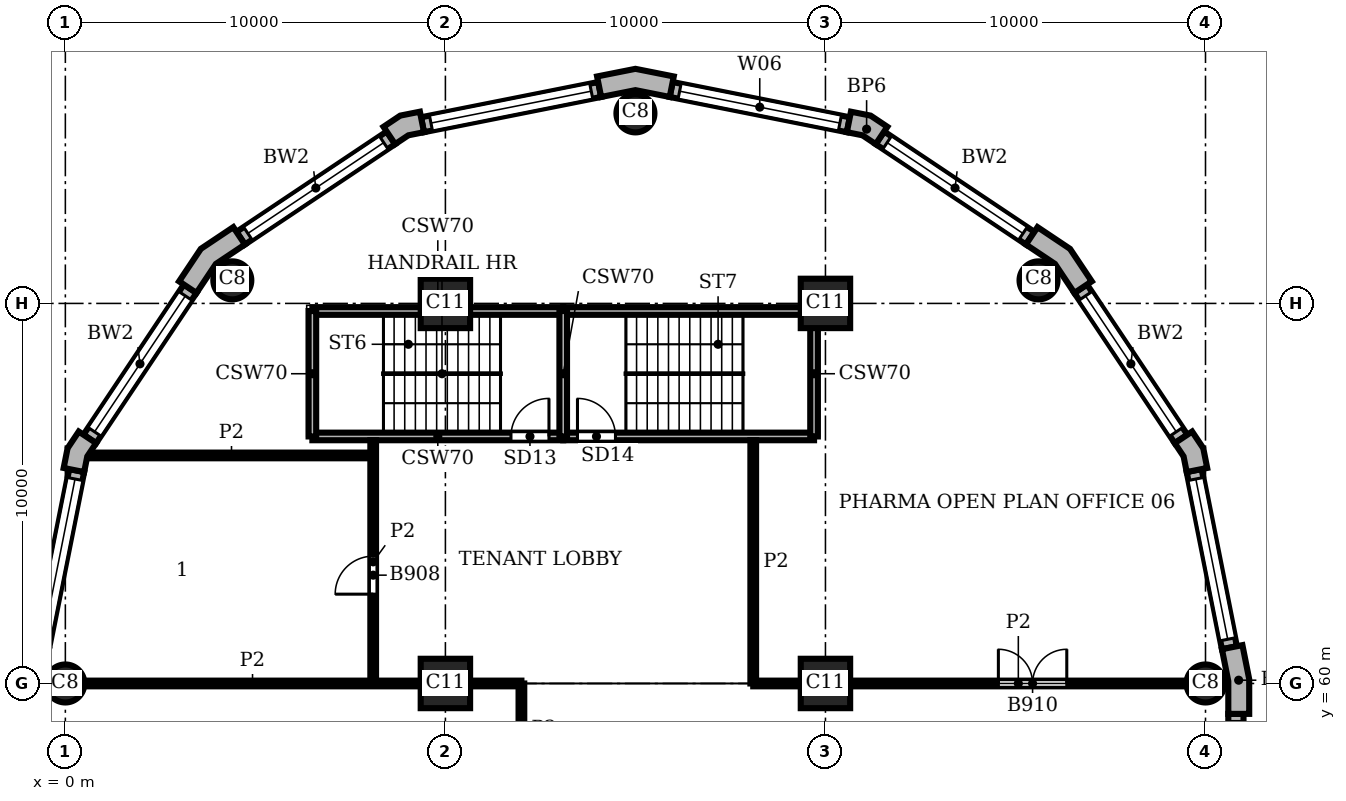
"""IFC4 building model, lengths in metres.
Left out: names, types, materials, properties, quantities, classifications, styles, units other than length and angle.
Written with IfcOpenShell. Run it as: python <this file> out.ifc"""

import sys

from ifc_helpers import new_model, si_unit, direction, frame, frame_2d, origin, origin_2d, place, context, subcontext, project, spatial, polyline, rectangle, circle, outline, extrude, element, fill, save


model = new_model("IFC4")
c1 = context("Model", 3, precision=1e-05, world=origin(), true_north=direction((0.0, 1.0)))
c2 = subcontext(c1, "Body", "Model", "MODEL_VIEW")
j1 = project(units=[si_unit("LENGTHUNIT", "METRE"), si_unit("PLANEANGLEUNIT", "RADIAN")], contexts=[c1])
p1 = place(None, origin())
s1 = spatial("IfcSite", under=j1, at=p1, CompositionType="ELEMENT")
p2 = place(p1, origin())
s2 = spatial("IfcBuilding", under=s1, at=p2, CompositionType="ELEMENT")
p3 = place(p2, frame((0.0, 0.0, 233.1)))
s3 = spatial("IfcBuildingStorey", under=s2, at=p3, CompositionType="ELEMENT", Elevation=233.1)
for number, where, z_axis, x_axis in (
    (1, (30.0, 60.0, 0.0), (0.0, 0.0, 1.0), (1.0, 0.0, 0.0)),
    (2, (25.607, 70.607, 0.0), (0.0, 0.0, 1.0), (1.0, 0.0, 0.0)),
    (3, (15.0, 75.0, 0.0), (0.0, 0.0, 1.0), (1.0, 0.0, 0.0)),
    (4, (4.393, 70.607, 0.0), (0.0, 0.0, 1.0), (1.0, 0.0, 0.0)),
    (5, (0.0, 60.0, 0.0), (0.0, 0.0, 1.0), (1.0, 0.0, 0.0)),
):
    element("IfcColumn", number, at=place(p3, frame(where, z_axis=z_axis, x_axis=x_axis)), inside=s3, PredefinedType="COLUMN", context=c2, shape_type="SweptSolid", body=[
        extrude(circle(Radius=0.5, at=origin_2d()), origin(), (0.0, 0.0, 1.0), 3.9),
    ])
for number, where, z_axis, x_axis in (
    (6, (10.0, 60.0, 0.0), (0.0, 0.0, 1.0), (1.0, 0.0, 0.0)),
    (7, (10.0, 70.0, 0.0), (0.0, 0.0, 1.0), (1.0, 0.0, 0.0)),
    (8, (20.0, 60.0, 0.0), (0.0, 0.0, 1.0), (1.0, 0.0, 0.0)),
    (9, (20.0, 70.0, 0.0), (0.0, 0.0, 1.0), (1.0, 0.0, 0.0)),
):
    element("IfcColumn", number, at=place(p3, frame(where, z_axis=z_axis, x_axis=x_axis)), inside=s3, PredefinedType="COLUMN", context=c2, shape_type="SweptSolid", body=[
        extrude(rectangle(XDim=1.3, YDim=1.3, at=origin_2d()), origin(), (0.0, 0.0, 1.0), 3.9),
    ])
p4 = place(p3, origin())
e10 = element("IfcWall", 10, at=p4, inside=s3, PredefinedType="SOLIDWALL", context=c2, shape_type="SweptSolid", body=[
    extrude(outline(polyline([(31.0, 59.2), (31.15, 59.2), (31.15, 60.113), (30.972, 61.009), (30.825, 60.98), (30.432, 60.902), (30.6, 60.059), (30.6, 59.2), (31.0, 59.2)])), origin(), (0.0, 0.0, 1.0), 3.9),
])
e11 = element("IfcWall", 11, at=p4, inside=s3, PredefinedType="SOLIDWALL", context=c2, shape_type="SweptSolid", body=[
    extrude(outline(polyline([(29.897, 65.641), (30.045, 65.67), (29.941, 66.189), (29.648, 66.629), (29.523, 66.545), (29.19, 66.323), (29.423, 65.974), (29.505, 65.563), (29.897, 65.641)])), origin(), (0.0, 0.0, 1.0), 3.9),
])
e12 = element("IfcWall", 12, at=p4, inside=s3, PredefinedType="SOLIDWALL", context=c2, shape_type="SweptSolid", body=[
    extrude(outline(polyline([(26.883, 70.497), (27.007, 70.58), (26.436, 71.436), (25.58, 72.007), (25.497, 71.883), (25.275, 71.55), (26.039, 71.039), (26.55, 70.275), (26.883, 70.497)])), origin(), (0.0, 0.0, 1.0), 3.9),
])
e13 = element("IfcWall", 13, at=p4, inside=s3, PredefinedType="SOLIDWALL", context=c2, shape_type="SweptSolid", body=[
    extrude(outline(polyline([(21.545, 74.523), (21.629, 74.648), (21.189, 74.941), (20.67, 75.045), (20.641, 74.897), (20.563, 74.505), (20.974, 74.423), (21.323, 74.19), (21.545, 74.523)])), origin(), (0.0, 0.0, 1.0), 3.9),
])
e14 = element("IfcWall", 14, at=p4, inside=s3, PredefinedType="SOLIDWALL", context=c2, shape_type="SweptSolid", body=[
    extrude(outline(polyline([(15.98, 75.825), (16.009, 75.972), (15.0, 76.173), (13.991, 75.972), (14.02, 75.825), (14.098, 75.432), (15.0, 75.612), (15.902, 75.432), (15.98, 75.825)])), origin(), (0.0, 0.0, 1.0), 3.9),
])
e15 = element("IfcWall", 15, at=p4, inside=s3, PredefinedType="SOLIDWALL", context=c2, shape_type="SweptSolid", body=[
    extrude(outline(polyline([(9.359, 74.897), (9.33, 75.045), (8.811, 74.941), (8.371, 74.648), (8.455, 74.523), (8.677, 74.19), (9.026, 74.423), (9.437, 74.505), (9.359, 74.897)])), origin(), (0.0, 0.0, 1.0), 3.9),
])
e16 = element("IfcWall", 16, at=p4, inside=s3, PredefinedType="SOLIDWALL", context=c2, shape_type="SweptSolid", body=[
    extrude(outline(polyline([(4.503, 71.883), (4.42, 72.007), (3.564, 71.436), (2.993, 70.58), (3.117, 70.497), (3.45, 70.275), (3.961, 71.039), (4.725, 71.55), (4.503, 71.883)])), origin(), (0.0, 0.0, 1.0), 3.9),
])
e17 = element("IfcWall", 17, at=p4, inside=s3, PredefinedType="SOLIDWALL", context=c2, shape_type="SweptSolid", body=[
    extrude(outline(polyline([(0.477, 66.545), (0.352, 66.629), (0.059, 66.189), (-0.045, 65.67), (0.103, 65.641), (0.495, 65.563), (0.577, 65.974), (0.81, 66.323), (0.477, 66.545)])), origin(), (0.0, 0.0, 1.0), 3.9),
])
p5 = place(p3, frame((30.8, 40.8, 0.0), z_axis=(0.0, 0.0, 1.0), x_axis=(0.0, 1.0, 0.0)))
e18 = element("IfcWall", 18, at=p5, inside=s3, PredefinedType="SOLIDWALL", context=c2, shape_type="SweptSolid", body=[
    extrude(rectangle(XDim=18.4, YDim=0.4, at=frame_2d((9.2, 0.0))), origin(), (0.0, 0.0, 1.0), 3.9),
])
p6 = place(p5, frame((0.2, 0.0, 0.9)))
e19 = element("IfcOpeningElement", 19, at=p6, cuts=e18, PredefinedType="OPENING", context=c2, shape_type="SweptSolid", body=[
    extrude(rectangle(XDim=8.0, YDim=2.35, at=frame_2d((4.0, 1.175))), frame((0.0, 0.21, 0.0), z_axis=(0.0, -1.0, 0.0), x_axis=(1.0, 0.0, 0.0)), (0.0, 0.0, 1.0), 0.42),
])
p7 = place(p5, frame((10.2, 0.0, 0.9)))
e20 = element("IfcOpeningElement", 20, at=p7, cuts=e18, PredefinedType="OPENING", context=c2, shape_type="SweptSolid", body=[
    extrude(rectangle(XDim=8.0, YDim=2.35, at=frame_2d((4.0, 1.175))), frame((0.0, 0.21, 0.0), z_axis=(0.0, -1.0, 0.0), x_axis=(1.0, 0.0, 0.0)), (0.0, 0.0, 1.0), 0.42),
])
p8 = place(p3, frame((30.629, 60.941, 0.0), z_axis=(0.0, 0.0, 1.0), x_axis=(-0.195098533057, 0.98078364709, 0.0)))
e21 = element("IfcWall", 21, at=p8, inside=s3, PredefinedType="SOLIDWALL", context=c2, shape_type="SweptSolid", body=[
    extrude(rectangle(XDim=4.753, YDim=0.4, at=frame_2d((2.376, 0.0))), origin(), (0.0, 0.0, 1.0), 3.9),
])
p9 = place(p8, frame((0.226, 0.0, 0.9)))
e22 = element("IfcOpeningElement", 22, at=p9, cuts=e21, PredefinedType="OPENING", context=c2, shape_type="SweptSolid", body=[
    extrude(rectangle(XDim=4.3, YDim=2.35, at=frame_2d((2.15, 1.175))), frame((0.0, 0.21, 0.0), z_axis=(0.0, -1.0, 0.0), x_axis=(1.0, 0.0, 0.0)), (0.0, 0.0, 1.0), 0.42),
])
p10 = place(p3, frame((29.357, 66.434, 0.0), z_axis=(0.0, 0.0, 1.0), x_axis=(-0.555541552266, 0.831488775454, 0.0)))
e23 = element("IfcWall", 23, at=p10, inside=s3, PredefinedType="SOLIDWALL", context=c2, shape_type="SweptSolid", body=[
    extrude(rectangle(XDim=4.753, YDim=0.4, at=frame_2d((2.376, 0.0))), origin(), (0.0, 0.0, 1.0), 3.9),
])
p11 = place(p10, frame((0.226, 0.0, 0.9)))
e24 = element("IfcOpeningElement", 24, at=p11, cuts=e23, PredefinedType="OPENING", context=c2, shape_type="SweptSolid", body=[
    extrude(rectangle(XDim=4.3, YDim=2.35, at=frame_2d((2.15, 1.175))), frame((0.0, 0.21, 0.0), z_axis=(0.0, -1.0, 0.0), x_axis=(1.0, 0.0, 0.0)), (0.0, 0.0, 1.0), 0.42),
])
p12 = place(p3, frame((25.386, 71.716, 0.0), z_axis=(0.0, 0.0, 1.0), x_axis=(-0.831488775454, 0.555541552266, 0.0)))
e25 = element("IfcWall", 25, at=p12, inside=s3, PredefinedType="SOLIDWALL", context=c2, shape_type="SweptSolid", body=[
    extrude(rectangle(XDim=4.753, YDim=0.4, at=frame_2d((2.376, 0.0))), origin(), (0.0, 0.0, 1.0), 3.9),
])
p13 = place(p12, frame((0.226, 0.0, 0.9)))
e26 = element("IfcOpeningElement", 26, at=p13, cuts=e25, PredefinedType="OPENING", context=c2, shape_type="SweptSolid", body=[
    extrude(rectangle(XDim=4.3, YDim=2.35, at=frame_2d((2.15, 1.175))), frame((0.0, 0.21, 0.0), z_axis=(0.0, -1.0, 0.0), x_axis=(1.0, 0.0, 0.0)), (0.0, 0.0, 1.0), 0.42),
])
p14 = place(p3, frame((20.602, 74.701, 0.0), z_axis=(0.0, 0.0, 1.0), x_axis=(-0.98078364709, 0.195098533057, 0.0)))
e27 = element("IfcWall", 27, at=p14, inside=s3, PredefinedType="SOLIDWALL", context=c2, shape_type="SweptSolid", body=[
    extrude(rectangle(XDim=4.753, YDim=0.4, at=frame_2d((2.376, 0.0))), origin(), (0.0, 0.0, 1.0), 3.9),
])
p15 = place(p14, frame((0.226, 0.0, 0.9)))
e28 = element("IfcOpeningElement", 28, at=p15, cuts=e27, PredefinedType="OPENING", context=c2, shape_type="SweptSolid", body=[
    extrude(rectangle(XDim=4.3, YDim=2.35, at=frame_2d((2.15, 1.175))), frame((0.0, 0.21, 0.0), z_axis=(0.0, -1.0, 0.0), x_axis=(1.0, 0.0, 0.0)), (0.0, 0.0, 1.0), 0.42),
])
p16 = place(p3, frame((14.059, 75.629, 0.0), z_axis=(0.0, 0.0, 1.0), x_axis=(-0.98078364709, -0.195098533057, 0.0)))
e29 = element("IfcWall", 29, at=p16, inside=s3, PredefinedType="SOLIDWALL", context=c2, shape_type="SweptSolid", body=[
    extrude(rectangle(XDim=4.753, YDim=0.4, at=frame_2d((2.376, 0.0))), origin(), (0.0, 0.0, 1.0), 3.9),
])
p17 = place(p16, frame((0.226, 0.0, 0.9)))
e30 = element("IfcOpeningElement", 30, at=p17, cuts=e29, PredefinedType="OPENING", context=c2, shape_type="SweptSolid", body=[
    extrude(rectangle(XDim=4.3, YDim=2.35, at=frame_2d((2.15, 1.175))), frame((0.0, 0.21, 0.0), z_axis=(0.0, -1.0, 0.0), x_axis=(1.0, 0.0, 0.0)), (0.0, 0.0, 1.0), 0.42),
])
p18 = place(p3, frame((8.566, 74.357, 0.0), z_axis=(0.0, 0.0, 1.0), x_axis=(-0.831488775454, -0.555541552266, 0.0)))
e31 = element("IfcWall", 31, at=p18, inside=s3, PredefinedType="SOLIDWALL", context=c2, shape_type="SweptSolid", body=[
    extrude(rectangle(XDim=4.753, YDim=0.4, at=frame_2d((2.376, 0.0))), origin(), (0.0, 0.0, 1.0), 3.9),
])
p19 = place(p18, frame((0.226, 0.0, 0.9)))
e32 = element("IfcOpeningElement", 32, at=p19, cuts=e31, PredefinedType="OPENING", context=c2, shape_type="SweptSolid", body=[
    extrude(rectangle(XDim=4.3, YDim=2.35, at=frame_2d((2.15, 1.175))), frame((0.0, 0.21, 0.0), z_axis=(0.0, -1.0, 0.0), x_axis=(1.0, 0.0, 0.0)), (0.0, 0.0, 1.0), 0.42),
])
p20 = place(p3, frame((3.284, 70.386, 0.0), z_axis=(0.0, 0.0, 1.0), x_axis=(-0.555541552266, -0.831488775454, 0.0)))
e33 = element("IfcWall", 33, at=p20, inside=s3, PredefinedType="SOLIDWALL", context=c2, shape_type="SweptSolid", body=[
    extrude(rectangle(XDim=4.753, YDim=0.4, at=frame_2d((2.376, 0.0))), origin(), (0.0, 0.0, 1.0), 3.9),
])
p21 = place(p20, frame((0.226, 0.0, 0.9)))
e34 = element("IfcOpeningElement", 34, at=p21, cuts=e33, PredefinedType="OPENING", context=c2, shape_type="SweptSolid", body=[
    extrude(rectangle(XDim=4.3, YDim=2.35, at=frame_2d((2.15, 1.175))), frame((0.0, 0.21, 0.0), z_axis=(0.0, -1.0, 0.0), x_axis=(1.0, 0.0, 0.0)), (0.0, 0.0, 1.0), 0.42),
])
p22 = place(p3, frame((0.299, 65.602, 0.0), z_axis=(0.0, 0.0, 1.0), x_axis=(-0.195098533057, -0.98078364709, 0.0)))
e35 = element("IfcWall", 35, at=p22, inside=s3, PredefinedType="SOLIDWALL", context=c2, shape_type="SweptSolid", body=[
    extrude(rectangle(XDim=4.753, YDim=0.4, at=frame_2d((2.376, 0.0))), origin(), (0.0, 0.0, 1.0), 3.9),
])
p23 = place(p22, frame((0.226, 0.0, 0.9)))
e36 = element("IfcOpeningElement", 36, at=p23, cuts=e35, PredefinedType="OPENING", context=c2, shape_type="SweptSolid", body=[
    extrude(rectangle(XDim=4.3, YDim=2.35, at=frame_2d((2.15, 1.175))), frame((0.0, 0.21, 0.0), z_axis=(0.0, -1.0, 0.0), x_axis=(1.0, 0.0, 0.0)), (0.0, 0.0, 1.0), 0.42),
])
p24 = place(p3, frame((6.5, 66.5, 0.0), z_axis=(0.0, 0.0, 1.0), x_axis=(1.0, 0.0, 0.0)))
e37 = element("IfcWall", 37, at=p24, inside=s3, PredefinedType="SHEAR", context=c2, shape_type="SweptSolid", body=[
    extrude(rectangle(XDim=6.6, YDim=0.2, at=frame_2d((3.3, 0.0))), origin(), (0.0, 0.0, 1.0), 3.45),
])
p25 = place(p24, frame((5.225, 0.0, 0.0)))
e38 = element("IfcOpeningElement", 38, at=p25, cuts=e37, PredefinedType="OPENING", context=c2, shape_type="SweptSolid", body=[
    extrude(rectangle(XDim=1.0, YDim=2.1, at=frame_2d((0.5, 1.05))), frame((0.0, 0.11, 0.0), z_axis=(0.0, -1.0, 0.0), x_axis=(1.0, 0.0, 0.0)), (0.0, 0.0, 1.0), 0.22),
])
p26 = place(p3, frame((13.1, 66.5, 0.0), z_axis=(0.0, 0.0, 1.0), x_axis=(1.0, 0.0, 0.0)))
e39 = element("IfcWall", 39, at=p26, inside=s3, PredefinedType="SHEAR", context=c2, shape_type="SweptSolid", body=[
    extrude(rectangle(XDim=6.6, YDim=0.2, at=frame_2d((3.3, 0.0))), origin(), (0.0, 0.0, 1.0), 3.45),
])
p27 = place(p26, frame((0.375, 0.0, 0.0)))
e40 = element("IfcOpeningElement", 40, at=p27, cuts=e39, PredefinedType="OPENING", context=c2, shape_type="SweptSolid", body=[
    extrude(rectangle(XDim=1.0, YDim=2.1, at=frame_2d((0.5, 1.05))), frame((0.0, 0.11, 0.0), z_axis=(0.0, -1.0, 0.0), x_axis=(1.0, 0.0, 0.0)), (0.0, 0.0, 1.0), 0.22),
])
p28 = place(p3, frame((6.5, 69.8, 0.0), z_axis=(0.0, 0.0, 1.0), x_axis=(1.0, 0.0, 0.0)))
e41 = element("IfcWall", 41, at=p28, inside=s3, PredefinedType="SHEAR", context=c2, shape_type="SweptSolid", body=[
    extrude(rectangle(XDim=6.6, YDim=0.2, at=frame_2d((3.3, 0.0))), origin(), (0.0, 0.0, 1.0), 3.45),
])
p29 = place(p3, frame((13.1, 69.8, 0.0), z_axis=(0.0, 0.0, 1.0), x_axis=(1.0, 0.0, 0.0)))
e42 = element("IfcWall", 42, at=p29, inside=s3, PredefinedType="SHEAR", context=c2, shape_type="SweptSolid", body=[
    extrude(rectangle(XDim=6.6, YDim=0.2, at=frame_2d((3.3, 0.0))), origin(), (0.0, 0.0, 1.0), 3.45),
])
for number, where, z_axis, x_axis in (
    (43, (6.5, 66.5, 0.0), (0.0, 0.0, 1.0), (0.0, 1.0, 0.0)),
    (44, (13.1, 66.5, 0.0), (0.0, 0.0, 1.0), (0.0, 1.0, 0.0)),
    (45, (19.7, 66.5, 0.0), (0.0, 0.0, 1.0), (0.0, 1.0, 0.0)),
):
    element("IfcWall", number, at=place(p3, frame(where, z_axis=z_axis, x_axis=x_axis)), inside=s3, PredefinedType="SHEAR", context=c2, shape_type="SweptSolid", body=[
        extrude(rectangle(XDim=3.3, YDim=0.2, at=frame_2d((1.65, 0.0))), origin(), (0.0, 0.0, 1.0), 3.45),
    ])
p30 = place(p3, frame((8.1, 60.0, 0.0), z_axis=(0.0, 0.0, 1.0), x_axis=(0.0, 1.0, 0.0)))
e46 = element("IfcWall", 46, at=p30, inside=s3, PredefinedType="PARTITIONING", context=c2, shape_type="SweptSolid", body=[
    extrude(rectangle(XDim=6.4, YDim=0.15, at=frame_2d((3.2, 0.0))), origin(), (0.0, 0.0, 1.0), 3.45),
])
p31 = place(p30, frame((2.35, 0.0, 0.0)))
e47 = element("IfcOpeningElement", 47, at=p31, cuts=e46, PredefinedType="OPENING", context=c2, shape_type="SweptSolid", body=[
    extrude(rectangle(XDim=1.0, YDim=2.1, at=frame_2d((0.5, 1.05))), frame((0.0, 0.085, 0.0), z_axis=(0.0, -1.0, 0.0), x_axis=(1.0, 0.0, 0.0)), (0.0, 0.0, 1.0), 0.17),
])
p32 = place(p3, frame((12.0, 57.6, 0.0), z_axis=(0.0, 0.0, 1.0), x_axis=(0.0, 1.0, 0.0)))
e48 = element("IfcWall", 48, at=p32, inside=s3, PredefinedType="PARTITIONING", context=c2, shape_type="SweptSolid", body=[
    extrude(rectangle(XDim=2.4, YDim=0.15, at=frame_2d((1.2, 0.0))), origin(), (0.0, 0.0, 1.0), 3.45),
])
p33 = place(p3, frame((18.1, 60.0, 0.0), z_axis=(0.0, 0.0, 1.0), x_axis=(0.0, 1.0, 0.0)))
e49 = element("IfcWall", 49, at=p33, inside=s3, PredefinedType="PARTITIONING", context=c2, shape_type="SweptSolid", body=[
    extrude(rectangle(XDim=6.4, YDim=0.15, at=frame_2d((3.2, 0.0))), origin(), (0.0, 0.0, 1.0), 3.45),
])
p34 = place(p3, frame((0.5, 60.0, 0.0), z_axis=(0.0, 0.0, 1.0), x_axis=(1.0, 0.0, 0.0)))
e50 = element("IfcWall", 50, at=p34, inside=s3, PredefinedType="PARTITIONING", context=c2, shape_type="SweptSolid", body=[
    extrude(rectangle(XDim=8.85, YDim=0.15, at=frame_2d((4.425, 0.0))), origin(), (0.0, 0.0, 1.0), 3.45),
])
p35 = place(p3, frame((10.65, 60.0, 0.0), z_axis=(0.0, 0.0, 1.0), x_axis=(1.0, 0.0, 0.0)))
e51 = element("IfcWall", 51, at=p35, inside=s3, PredefinedType="PARTITIONING", context=c2, shape_type="SweptSolid", body=[
    extrude(rectangle(XDim=1.35, YDim=0.15, at=frame_2d((0.675, 0.0))), origin(), (0.0, 0.0, 1.0), 3.45),
])
p36 = place(p3, frame((18.1, 60.0, 0.0), z_axis=(0.0, 0.0, 1.0), x_axis=(1.0, 0.0, 0.0)))
e52 = element("IfcWall", 52, at=p36, inside=s3, PredefinedType="PARTITIONING", context=c2, shape_type="SweptSolid", body=[
    extrude(rectangle(XDim=1.25, YDim=0.15, at=frame_2d((0.625, 0.0))), origin(), (0.0, 0.0, 1.0), 3.45),
])
p37 = place(p3, frame((20.65, 60.0, 0.0), z_axis=(0.0, 0.0, 1.0), x_axis=(1.0, 0.0, 0.0)))
e53 = element("IfcWall", 53, at=p37, inside=s3, PredefinedType="PARTITIONING", context=c2, shape_type="SweptSolid", body=[
    extrude(rectangle(XDim=8.85, YDim=0.15, at=frame_2d((4.425, 0.0))), origin(), (0.0, 0.0, 1.0), 3.45),
])
p38 = place(p37, frame((3.9, 0.0, 0.0)))
e54 = element("IfcOpeningElement", 54, at=p38, cuts=e53, PredefinedType="OPENING", context=c2, shape_type="SweptSolid", body=[
    extrude(rectangle(XDim=1.8, YDim=2.1, at=frame_2d((0.9, 1.05))), frame((0.0, 0.085, 0.0), z_axis=(0.0, -1.0, 0.0), x_axis=(1.0, 0.0, 0.0)), (0.0, 0.0, 1.0), 0.17),
])
p39 = place(p3, frame((0.644, 66.0, 0.0), z_axis=(0.0, 0.0, 1.0), x_axis=(1.0, 0.0, 0.0)))
e55 = element("IfcWall", 55, at=p39, inside=s3, PredefinedType="PARTITIONING", context=c2, shape_type="SweptSolid", body=[
    extrude(rectangle(XDim=7.456, YDim=0.15, at=frame_2d((3.728, 0.0))), origin(), (0.0, 0.0, 1.0), 3.45),
])
p40 = place(p9, origin())
e56 = element("IfcWindow", 56, at=p40, inside=s3, PartitioningType="SINGLE_PANEL", PredefinedType="WINDOW", context=c2, shape_type="SweptSolid", body=[
    extrude(rectangle(XDim=4.3, YDim=2.35, at=frame_2d((2.15, 1.175))), frame((0.0, 0.16, 0.0), z_axis=(0.0, -1.0, 0.0), x_axis=(1.0, 0.0, 0.0)), (0.0, 0.0, 1.0), 0.06),
])
fill(e22, e56)
p41 = place(p11, origin())
e57 = element("IfcWindow", 57, at=p41, inside=s3, PartitioningType="SINGLE_PANEL", PredefinedType="WINDOW", context=c2, shape_type="SweptSolid", body=[
    extrude(rectangle(XDim=4.3, YDim=2.35, at=frame_2d((2.15, 1.175))), frame((0.0, 0.16, 0.0), z_axis=(0.0, -1.0, 0.0), x_axis=(1.0, 0.0, 0.0)), (0.0, 0.0, 1.0), 0.06),
])
fill(e24, e57)
p42 = place(p13, origin())
e58 = element("IfcWindow", 58, at=p42, inside=s3, PartitioningType="SINGLE_PANEL", PredefinedType="WINDOW", context=c2, shape_type="SweptSolid", body=[
    extrude(rectangle(XDim=4.3, YDim=2.35, at=frame_2d((2.15, 1.175))), frame((0.0, 0.16, 0.0), z_axis=(0.0, -1.0, 0.0), x_axis=(1.0, 0.0, 0.0)), (0.0, 0.0, 1.0), 0.06),
])
fill(e26, e58)
p43 = place(p15, origin())
e59 = element("IfcWindow", 59, at=p43, inside=s3, PartitioningType="SINGLE_PANEL", PredefinedType="WINDOW", context=c2, shape_type="SweptSolid", body=[
    extrude(rectangle(XDim=4.3, YDim=2.35, at=frame_2d((2.15, 1.175))), frame((0.0, 0.16, 0.0), z_axis=(0.0, -1.0, 0.0), x_axis=(1.0, 0.0, 0.0)), (0.0, 0.0, 1.0), 0.06),
])
fill(e28, e59)
p44 = place(p17, origin())
e60 = element("IfcWindow", 60, at=p44, inside=s3, PartitioningType="SINGLE_PANEL", PredefinedType="WINDOW", context=c2, shape_type="SweptSolid", body=[
    extrude(rectangle(XDim=4.3, YDim=2.35, at=frame_2d((2.15, 1.175))), frame((0.0, 0.16, 0.0), z_axis=(0.0, -1.0, 0.0), x_axis=(1.0, 0.0, 0.0)), (0.0, 0.0, 1.0), 0.06),
])
fill(e30, e60)
p45 = place(p19, origin())
e61 = element("IfcWindow", 61, at=p45, inside=s3, PartitioningType="SINGLE_PANEL", PredefinedType="WINDOW", context=c2, shape_type="SweptSolid", body=[
    extrude(rectangle(XDim=4.3, YDim=2.35, at=frame_2d((2.15, 1.175))), frame((0.0, 0.16, 0.0), z_axis=(0.0, -1.0, 0.0), x_axis=(1.0, 0.0, 0.0)), (0.0, 0.0, 1.0), 0.06),
])
fill(e32, e61)
p46 = place(p21, origin())
e62 = element("IfcWindow", 62, at=p46, inside=s3, PartitioningType="SINGLE_PANEL", PredefinedType="WINDOW", context=c2, shape_type="SweptSolid", body=[
    extrude(rectangle(XDim=4.3, YDim=2.35, at=frame_2d((2.15, 1.175))), frame((0.0, 0.16, 0.0), z_axis=(0.0, -1.0, 0.0), x_axis=(1.0, 0.0, 0.0)), (0.0, 0.0, 1.0), 0.06),
])
fill(e34, e62)
p47 = place(p23, origin())
e63 = element("IfcWindow", 63, at=p47, inside=s3, PartitioningType="SINGLE_PANEL", PredefinedType="WINDOW", context=c2, shape_type="SweptSolid", body=[
    extrude(rectangle(XDim=4.3, YDim=2.35, at=frame_2d((2.15, 1.175))), frame((0.0, 0.16, 0.0), z_axis=(0.0, -1.0, 0.0), x_axis=(1.0, 0.0, 0.0)), (0.0, 0.0, 1.0), 0.06),
])
fill(e36, e63)
p48 = place(p25, origin())
e64 = element("IfcDoor", 64, at=p48, inside=s3, OperationType="SINGLE_SWING_RIGHT", PredefinedType="DOOR", context=c2, shape_type="SweptSolid", body=[
    extrude(rectangle(XDim=1.0, YDim=2.1, at=frame_2d((0.5, 1.05))), frame((0.0, 0.025, 0.0), z_axis=(0.0, -1.0, 0.0), x_axis=(1.0, 0.0, 0.0)), (0.0, 0.0, 1.0), 0.05),
])
fill(e38, e64)
p49 = place(p27, origin())
e65 = element("IfcDoor", 65, at=p49, inside=s3, OperationType="SINGLE_SWING_LEFT", PredefinedType="DOOR", context=c2, shape_type="SweptSolid", body=[
    extrude(rectangle(XDim=1.0, YDim=2.1, at=frame_2d((0.5, 1.05))), frame((0.0, 0.025, 0.0), z_axis=(0.0, -1.0, 0.0), x_axis=(1.0, 0.0, 0.0)), (0.0, 0.0, 1.0), 0.05),
])
fill(e40, e65)
p50 = place(p31, origin())
e66 = element("IfcDoor", 66, at=p50, inside=s3, OperationType="SINGLE_SWING_LEFT", PredefinedType="DOOR", context=c2, shape_type="SweptSolid", body=[
    extrude(rectangle(XDim=1.0, YDim=2.1, at=frame_2d((0.5, 1.05))), frame((0.0, 0.025, 0.0), z_axis=(0.0, -1.0, 0.0), x_axis=(1.0, 0.0, 0.0)), (0.0, 0.0, 1.0), 0.05),
])
fill(e47, e66)
p51 = place(p38, origin())
e67 = element("IfcDoor", 67, at=p51, inside=s3, OperationType="DOUBLE_DOOR_SINGLE_SWING", PredefinedType="DOOR", context=c2, shape_type="SweptSolid", body=[
    extrude(rectangle(XDim=1.8, YDim=2.1, at=frame_2d((0.9, 1.05))), frame((0.0, 0.025, 0.0), z_axis=(0.0, -1.0, 0.0), x_axis=(1.0, 0.0, 0.0)), (0.0, 0.0, 1.0), 0.05),
])
fill(e54, e67)
save(model, sys.argv[1])
